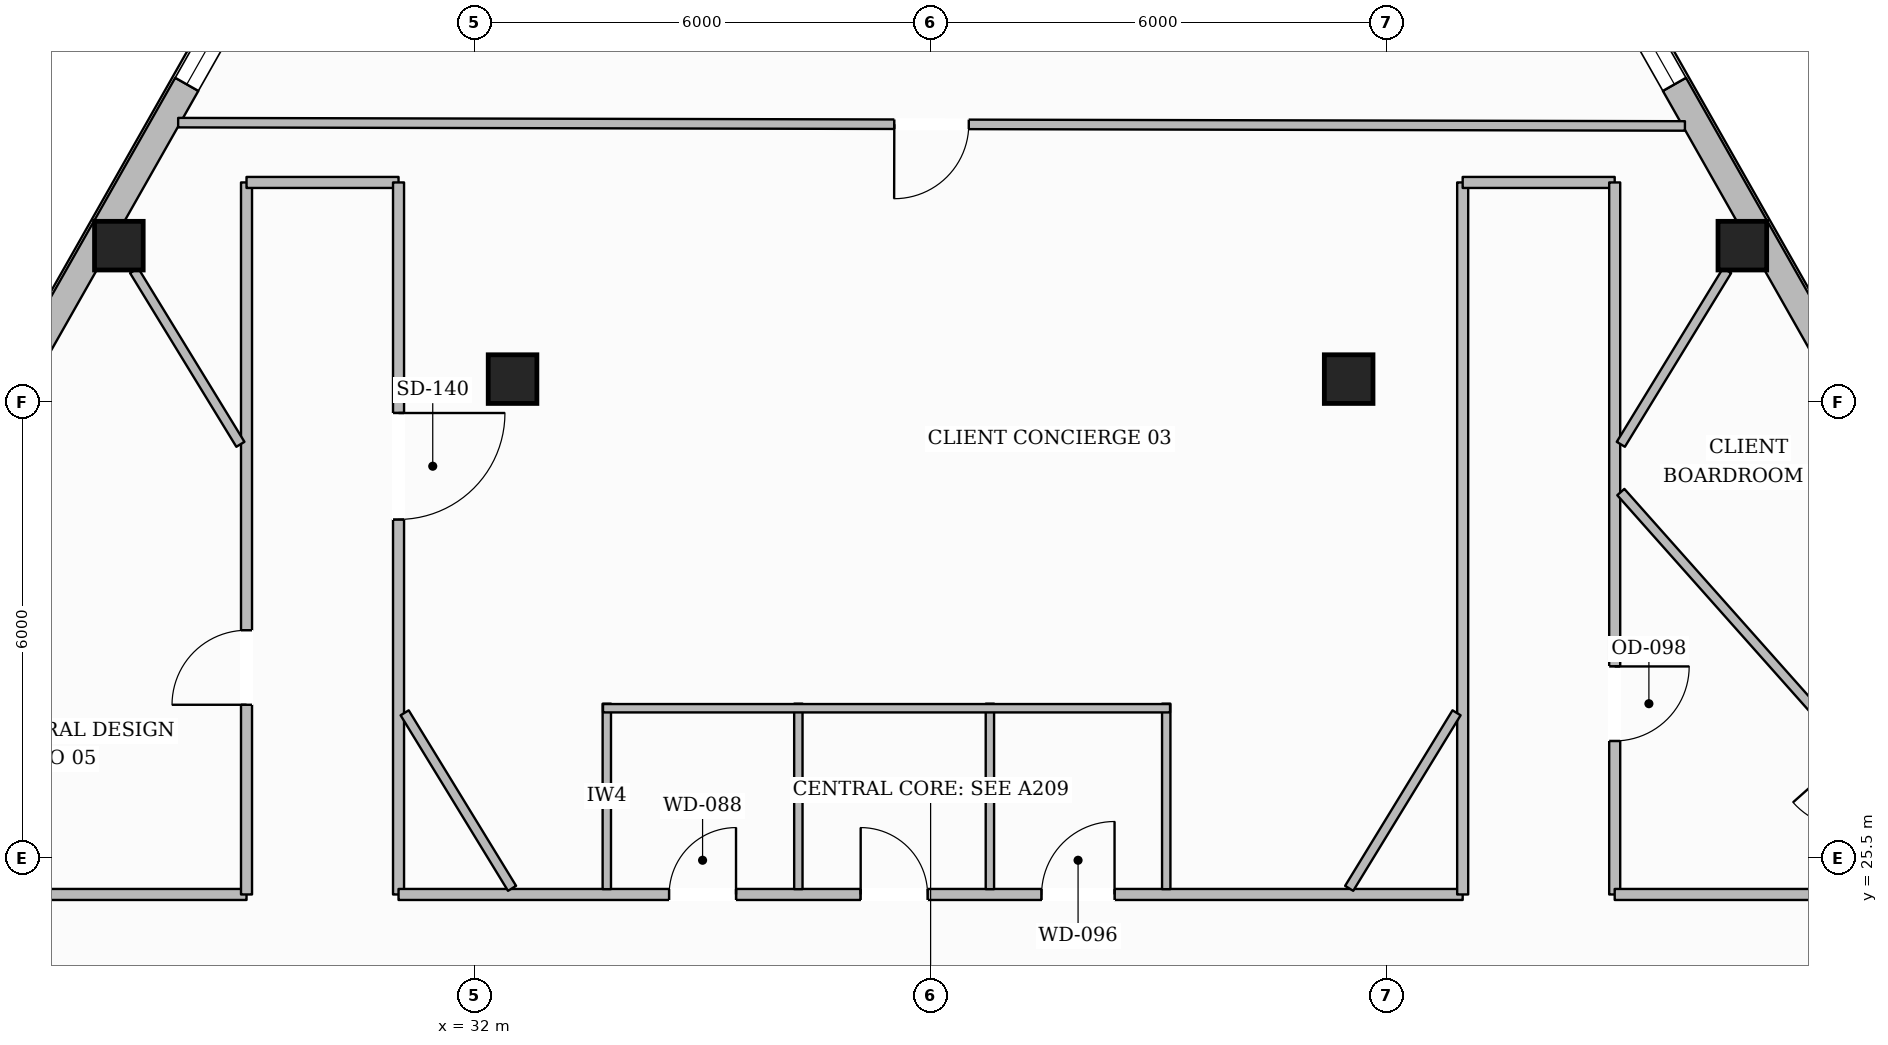
"""IFC4 building model, lengths in metres.
Left out: names, types, materials, properties, quantities, classifications, styles, units other than length and angle.
Written with IfcOpenShell. Run it as: python <this file> out.ifc"""

import sys

from ifc_helpers import new_model, si_unit, direction, frame, frame_2d, origin, origin_2d, place, context, subcontext, project, spatial, rectangle, hollow_rectangle, extrude, element, fill, save


model = new_model("IFC4")
c1 = context("Model", 3, precision=1e-05, world=origin(), true_north=direction((0.0, 1.0)))
c2 = subcontext(c1, "Body", "Model", "MODEL_VIEW")
j1 = project(units=[si_unit("LENGTHUNIT", "METRE"), si_unit("PLANEANGLEUNIT", "RADIAN")], contexts=[c1])
p1 = place(None, origin())
s1 = spatial("IfcSite", under=j1, at=p1, CompositionType="ELEMENT")
p2 = place(p1, origin())
s2 = spatial("IfcBuilding", under=s1, at=p2, CompositionType="ELEMENT")
p3 = place(p2, frame((0.0, 0.0, 165.0)))
s3 = spatial("IfcBuildingStorey", under=s2, at=p3, CompositionType="ELEMENT", Elevation=165.0)
for number, where, z_axis, x_axis in (
    (1, (27.321, 33.556, 0.0), (0.0, 0.0, 1.0), (1.0, 0.0, 0.0)),
    (2, (48.679, 33.556, 0.0), (0.0, 0.0, 1.0), (1.0, 0.0, 0.0)),
    (3, (32.5, 31.8, 0.0), (0.0, 0.0, 1.0), (1.0, 0.0, 0.0)),
    (4, (43.5, 31.8, 0.0), (0.0, 0.0, 1.0), (1.0, 0.0, 0.0)),
):
    element("IfcColumn", number, at=place(p3, frame(where, z_axis=z_axis, x_axis=x_axis)), inside=s3, PredefinedType="COLUMN", context=c2, shape_type="SweptSolid", body=[
        extrude(hollow_rectangle(XDim=0.64, YDim=0.64, WallThickness=0.028, at=origin_2d()), origin(), (0.0, 0.0, 1.0), 3.6),
    ])
p4 = place(p3, frame((14.964, 12.319, 0.0), z_axis=(0.0, 0.0, 1.0), x_axis=(0.493387150796, 0.869809817966, 0.0)))
e5 = element("IfcWall", 5, at=p4, inside=s3, PredefinedType="STANDARD", context=c2, shape_type="SweptSolid", body=[
    extrude(rectangle(XDim=37.096, YDim=0.35, at=frame_2d((18.548, 0.0))), origin(), (0.0, 0.0, 1.0), 3.132),
])
p5 = place(p4, frame((32.879, 0.0, 0.65)))
e6 = element("IfcOpeningElement", 6, at=p5, cuts=e5, PredefinedType="OPENING", context=c2, shape_type="SweptSolid", body=[
    extrude(rectangle(XDim=1.45, YDim=1.75, at=frame_2d((0.725, 0.875))), frame((0.0, 0.185, 0.0), z_axis=(0.0, -1.0, 0.0), x_axis=(1.0, 0.0, 0.0)), (0.0, 0.0, 1.0), 0.37),
])
p6 = place(p4, frame((26.855, 0.0, 0.65)))
e7 = element("IfcOpeningElement", 7, at=p6, cuts=e5, PredefinedType="OPENING", context=c2, shape_type="SweptSolid", body=[
    extrude(rectangle(XDim=1.45, YDim=1.75, at=frame_2d((0.725, 0.875))), frame((0.0, 0.185, 0.0), z_axis=(0.0, -1.0, 0.0), x_axis=(1.0, 0.0, 0.0)), (0.0, 0.0, 1.0), 0.37),
])
p7 = place(p4, frame((14.807, 0.0, 0.65)))
e8 = element("IfcOpeningElement", 8, at=p7, cuts=e5, PredefinedType="OPENING", context=c2, shape_type="SweptSolid", body=[
    extrude(rectangle(XDim=1.45, YDim=1.75, at=frame_2d((0.725, 0.875))), frame((0.0, 0.185, 0.0), z_axis=(0.0, -1.0, 0.0), x_axis=(1.0, 0.0, 0.0)), (0.0, 0.0, 1.0), 0.37),
])
p8 = place(p4, frame((8.783, 0.0, 0.65)))
e9 = element("IfcOpeningElement", 9, at=p8, cuts=e5, PredefinedType="OPENING", context=c2, shape_type="SweptSolid", body=[
    extrude(rectangle(XDim=1.45, YDim=1.75, at=frame_2d((0.725, 0.875))), frame((0.0, 0.185, 0.0), z_axis=(0.0, -1.0, 0.0), x_axis=(1.0, 0.0, 0.0)), (0.0, 0.0, 1.0), 0.37),
])
p9 = place(p4, frame((2.759, 0.0, 0.65)))
e10 = element("IfcOpeningElement", 10, at=p9, cuts=e5, PredefinedType="OPENING", context=c2, shape_type="SweptSolid", body=[
    extrude(rectangle(XDim=1.45, YDim=1.75, at=frame_2d((0.725, 0.875))), frame((0.0, 0.185, 0.0), z_axis=(0.0, -1.0, 0.0), x_axis=(1.0, 0.0, 0.0)), (0.0, 0.0, 1.0), 0.37),
])
p10 = place(p3, frame((42.733, 44.585, 0.0), z_axis=(0.0, 0.0, 1.0), x_axis=(0.493387150796, -0.869809817966, 0.0)))
e11 = element("IfcWall", 11, at=p10, inside=s3, PredefinedType="STANDARD", context=c2, shape_type="SweptSolid", body=[
    extrude(rectangle(XDim=37.096, YDim=0.35, at=frame_2d((18.548, 0.0))), origin(), (0.0, 0.0, 1.0), 3.132),
])
p11 = place(p10, frame((32.886, 0.0, 0.65)))
e12 = element("IfcOpeningElement", 12, at=p11, cuts=e11, PredefinedType="OPENING", context=c2, shape_type="SweptSolid", body=[
    extrude(rectangle(XDim=1.45, YDim=1.75, at=frame_2d((0.725, 0.875))), frame((0.0, 0.185, 0.0), z_axis=(0.0, -1.0, 0.0), x_axis=(1.0, 0.0, 0.0)), (0.0, 0.0, 1.0), 0.37),
])
p12 = place(p10, frame((26.863, 0.0, 0.65)))
e13 = element("IfcOpeningElement", 13, at=p12, cuts=e11, PredefinedType="OPENING", context=c2, shape_type="SweptSolid", body=[
    extrude(rectangle(XDim=1.45, YDim=1.75, at=frame_2d((0.725, 0.875))), frame((0.0, 0.185, 0.0), z_axis=(0.0, -1.0, 0.0), x_axis=(1.0, 0.0, 0.0)), (0.0, 0.0, 1.0), 0.37),
])
p13 = place(p10, frame((14.814, 0.0, 0.65)))
e14 = element("IfcOpeningElement", 14, at=p13, cuts=e11, PredefinedType="OPENING", context=c2, shape_type="SweptSolid", body=[
    extrude(rectangle(XDim=1.45, YDim=1.75, at=frame_2d((0.725, 0.875))), frame((0.0, 0.185, 0.0), z_axis=(0.0, -1.0, 0.0), x_axis=(1.0, 0.0, 0.0)), (0.0, 0.0, 1.0), 0.37),
])
p14 = place(p10, frame((8.791, 0.0, 0.65)))
e15 = element("IfcOpeningElement", 15, at=p14, cuts=e11, PredefinedType="OPENING", context=c2, shape_type="SweptSolid", body=[
    extrude(rectangle(XDim=1.45, YDim=1.75, at=frame_2d((0.725, 0.875))), frame((0.0, 0.185, 0.0), z_axis=(0.0, -1.0, 0.0), x_axis=(1.0, 0.0, 0.0)), (0.0, 0.0, 1.0), 0.37),
])
p15 = place(p10, frame((2.767, 0.0, 0.65)))
e16 = element("IfcOpeningElement", 16, at=p15, cuts=e11, PredefinedType="OPENING", context=c2, shape_type="SweptSolid", body=[
    extrude(rectangle(XDim=1.45, YDim=1.75, at=frame_2d((0.725, 0.875))), frame((0.0, 0.185, 0.0), z_axis=(0.0, -1.0, 0.0), x_axis=(1.0, 0.0, 0.0)), (0.0, 0.0, 1.0), 0.37),
])
p16 = place(p3, frame((26.06, 25.02, 0.0), z_axis=(0.0, 0.0, 1.0), x_axis=(1.0, 0.0, 0.0)))
e17 = element("IfcWall", 17, at=p16, inside=s3, PredefinedType="PARTITIONING", context=c2, shape_type="SweptSolid", body=[
    extrude(rectangle(XDim=2.94, YDim=0.145, at=frame_2d((1.47, 0.0))), origin(), (0.0, 0.0, 1.0), 3.6),
])
p17 = place(p3, frame((29.0, 25.02, 0.0), z_axis=(0.0, 0.0, 1.0), x_axis=(0.0, 1.0, 0.0)))
e18 = element("IfcWall", 18, at=p17, inside=s3, PredefinedType="PARTITIONING", context=c2, shape_type="SweptSolid", body=[
    extrude(rectangle(XDim=9.367, YDim=0.145, at=frame_2d((4.684, 0.0))), origin(), (0.0, 0.0, 1.0), 3.6),
])
p18 = place(p17, frame((2.496, 0.0, 0.0)))
e19 = element("IfcOpeningElement", 19, at=p18, cuts=e18, PredefinedType="OPENING", context=c2, shape_type="SweptSolid", body=[
    extrude(rectangle(XDim=0.98, YDim=2.15, at=frame_2d((0.49, 1.075))), frame((0.0, 0.083, 0.0), z_axis=(0.0, -1.0, 0.0), x_axis=(1.0, 0.0, 0.0)), (0.0, 0.0, 1.0), 0.165),
])
p19 = place(p3, frame((29.0, 34.387, 0.0), z_axis=(0.0, 0.0, 1.0), x_axis=(1.0, 0.0, 0.0)))
e20 = element("IfcWall", 20, at=p19, inside=s3, PredefinedType="PARTITIONING", context=c2, shape_type="SweptSolid", body=[
    extrude(rectangle(XDim=2.0, YDim=0.145, at=frame_2d((1.0, 0.0))), origin(), (0.0, 0.0, 1.0), 3.6),
])
p20 = place(p3, frame((31.0, 34.387, 0.0), z_axis=(0.0, 0.0, 1.0), x_axis=(0.0, -1.0, 0.0)))
e21 = element("IfcWall", 21, at=p20, inside=s3, PredefinedType="PARTITIONING", context=c2, shape_type="SweptSolid", body=[
    extrude(rectangle(XDim=9.367, YDim=0.145, at=frame_2d((4.684, 0.0))), origin(), (0.0, 0.0, 1.0), 3.6),
])
p21 = place(p20, frame((3.033, 0.0, 0.0)))
e22 = element("IfcOpeningElement", 22, at=p21, cuts=e21, PredefinedType="OPENING", context=c2, shape_type="SweptSolid", body=[
    extrude(rectangle(XDim=1.4, YDim=2.2, at=frame_2d((0.7, 1.1))), frame((0.0, 0.083, 0.0), z_axis=(0.0, -1.0, 0.0), x_axis=(1.0, 0.0, 0.0)), (0.0, 0.0, 1.0), 0.165),
])
p22 = place(p3, frame((31.0, 25.02, 0.0), z_axis=(0.0, 0.0, 1.0), x_axis=(1.0, 0.0, 0.0)))
e23 = element("IfcWall", 23, at=p22, inside=s3, PredefinedType="PARTITIONING", context=c2, shape_type="SweptSolid", body=[
    extrude(rectangle(XDim=14.0, YDim=0.145, at=frame_2d((7.0, 0.0))), origin(), (0.0, 0.0, 1.0), 3.6),
])
p23 = place(p22, frame((3.56, 0.0, 0.0)))
e24 = element("IfcOpeningElement", 24, at=p23, cuts=e23, PredefinedType="OPENING", context=c2, shape_type="SweptSolid", body=[
    extrude(rectangle(XDim=0.88, YDim=2.1, at=frame_2d((0.44, 1.05))), frame((0.0, 0.083, 0.0), z_axis=(0.0, -1.0, 0.0), x_axis=(1.0, 0.0, 0.0)), (0.0, 0.0, 1.0), 0.165),
])
p24 = place(p22, frame((6.08, 0.0, 0.0)))
e25 = element("IfcOpeningElement", 25, at=p24, cuts=e23, PredefinedType="OPENING", context=c2, shape_type="SweptSolid", body=[
    extrude(rectangle(XDim=0.88, YDim=2.1, at=frame_2d((0.44, 1.05))), frame((0.0, 0.083, 0.0), z_axis=(0.0, -1.0, 0.0), x_axis=(1.0, 0.0, 0.0)), (0.0, 0.0, 1.0), 0.165),
])
p25 = place(p22, frame((8.46, 0.0, 0.0)))
e26 = element("IfcOpeningElement", 26, at=p25, cuts=e23, PredefinedType="OPENING", context=c2, shape_type="SweptSolid", body=[
    extrude(rectangle(XDim=0.96, YDim=2.1, at=frame_2d((0.48, 1.05))), frame((0.0, 0.083, 0.0), z_axis=(0.0, -1.0, 0.0), x_axis=(1.0, 0.0, 0.0)), (0.0, 0.0, 1.0), 0.165),
])
p26 = place(p3, frame((45.0, 25.02, 0.0), z_axis=(0.0, 0.0, 1.0), x_axis=(0.0, 1.0, 0.0)))
e27 = element("IfcWall", 27, at=p26, inside=s3, PredefinedType="PARTITIONING", context=c2, shape_type="SweptSolid", body=[
    extrude(rectangle(XDim=9.367, YDim=0.145, at=frame_2d((4.684, 0.0))), origin(), (0.0, 0.0, 1.0), 3.6),
])
p27 = place(p3, frame((45.0, 34.387, 0.0), z_axis=(0.0, 0.0, 1.0), x_axis=(1.0, 0.0, 0.0)))
e28 = element("IfcWall", 28, at=p27, inside=s3, PredefinedType="PARTITIONING", context=c2, shape_type="SweptSolid", body=[
    extrude(rectangle(XDim=2.0, YDim=0.145, at=frame_2d((1.0, 0.0))), origin(), (0.0, 0.0, 1.0), 3.6),
])
p28 = place(p3, frame((47.0, 34.387, 0.0), z_axis=(0.0, 0.0, 1.0), x_axis=(0.0, -1.0, 0.0)))
e29 = element("IfcWall", 29, at=p28, inside=s3, PredefinedType="PARTITIONING", context=c2, shape_type="SweptSolid", body=[
    extrude(rectangle(XDim=9.367, YDim=0.145, at=frame_2d((4.684, 0.0))), origin(), (0.0, 0.0, 1.0), 3.6),
])
p29 = place(p28, frame((6.367, 0.0, 0.0)))
e30 = element("IfcOpeningElement", 30, at=p29, cuts=e29, PredefinedType="OPENING", context=c2, shape_type="SweptSolid", body=[
    extrude(rectangle(XDim=0.98, YDim=2.15, at=frame_2d((0.49, 1.075))), frame((0.0, 0.083, 0.0), z_axis=(0.0, -1.0, 0.0), x_axis=(1.0, 0.0, 0.0)), (0.0, 0.0, 1.0), 0.165),
])
p30 = place(p3, frame((47.0, 25.02, 0.0), z_axis=(0.0, 0.0, 1.0), x_axis=(1.0, 0.0, 0.0)))
e31 = element("IfcWall", 31, at=p30, inside=s3, PredefinedType="PARTITIONING", context=c2, shape_type="SweptSolid", body=[
    extrude(rectangle(XDim=2.94, YDim=0.145, at=frame_2d((1.47, 0.0))), origin(), (0.0, 0.0, 1.0), 3.6),
])
for number, where, z_axis, x_axis in (
    (32, (33.74, 25.09, 0.0), (0.0, 0.0, 1.0), (0.0, 1.0, 0.0)),
    (33, (36.26, 25.09, 0.0), (0.0, 0.0, 1.0), (0.0, 1.0, 0.0)),
    (34, (38.78, 25.09, 0.0), (0.0, 0.0, 1.0), (0.0, 1.0, 0.0)),
    (35, (41.1, 25.09, 0.0), (0.0, 0.0, 1.0), (0.0, 1.0, 0.0)),
):
    element("IfcWall", number, at=place(p3, frame(where, z_axis=z_axis, x_axis=x_axis)), inside=s3, PredefinedType="PLUMBINGWALL", context=c2, shape_type="SweptSolid", body=[
        extrude(rectangle(XDim=2.44, YDim=0.11, at=frame_2d((1.22, 0.0))), origin(), (0.0, 0.0, 1.0), 3.6),
    ])
p31 = place(p3, frame((33.69, 27.47, 0.0), z_axis=(0.0, 0.0, 1.0), x_axis=(1.0, 0.0, 0.0)))
e36 = element("IfcWall", 36, at=p31, inside=s3, PredefinedType="PLUMBINGWALL", context=c2, shape_type="SweptSolid", body=[
    extrude(rectangle(XDim=7.46, YDim=0.11, at=frame_2d((3.73, 0.0))), origin(), (0.0, 0.0, 1.0), 3.6),
])
p32 = place(p3, frame((43.507, 25.101, 0.0), z_axis=(0.0, 0.0, 1.0), x_axis=(0.521876732826, 0.853020911664, 0.0)))
e37 = element("IfcWall", 37, at=p32, inside=s3, PredefinedType="PARTITIONING", context=c2, shape_type="SweptSolid", body=[
    extrude(rectangle(XDim=2.707, YDim=0.125, at=frame_2d((1.354, 0.0))), origin(), (0.0, 0.0, 1.0), 3.6),
])
p33 = place(p3, frame((47.081, 30.942, 0.0), z_axis=(0.0, 0.0, 1.0), x_axis=(0.52187383072, 0.85302268716, 0.0)))
e38 = element("IfcWall", 38, at=p33, inside=s3, PredefinedType="PARTITIONING", context=c2, shape_type="SweptSolid", body=[
    extrude(rectangle(XDim=2.679, YDim=0.125, at=frame_2d((1.34, 0.0))), origin(), (0.0, 0.0, 1.0), 3.6),
])
p34 = place(p3, frame((32.493, 25.101, 0.0), z_axis=(0.0, 0.0, 1.0), x_axis=(-0.521876732826, 0.853020911664, 0.0)))
e39 = element("IfcWall", 39, at=p34, inside=s3, PredefinedType="PARTITIONING", context=c2, shape_type="SweptSolid", body=[
    extrude(rectangle(XDim=2.707, YDim=0.125, at=frame_2d((1.354, 0.0))), origin(), (0.0, 0.0, 1.0), 3.6),
])
p35 = place(p3, frame((28.919, 30.942, 0.0), z_axis=(0.0, 0.0, 1.0), x_axis=(-0.52187383072, 0.85302268716, 0.0)))
e40 = element("IfcWall", 40, at=p35, inside=s3, PredefinedType="PARTITIONING", context=c2, shape_type="SweptSolid", body=[
    extrude(rectangle(XDim=2.679, YDim=0.125, at=frame_2d((1.34, 0.0))), origin(), (0.0, 0.0, 1.0), 3.6),
])
p36 = place(p3, frame((53.807, 22.75, 0.0), z_axis=(0.0, 0.0, 1.0), x_axis=(-0.664519515039, 0.747270910803, 0.0)))
e41 = element("IfcWall", 41, at=p36, inside=s3, PredefinedType="PARTITIONING", context=c2, shape_type="SweptSolid", body=[
    extrude(rectangle(XDim=10.123, YDim=0.125, at=frame_2d((5.061, 0.0))), origin(), (0.0, 0.0, 1.0), 3.339),
])
p37 = place(p36, frame((4.547, 0.0, 0.0)))
e42 = element("IfcOpeningElement", 42, at=p37, cuts=e41, PredefinedType="OPENING", context=c2, shape_type="SweptSolid", body=[
    extrude(rectangle(XDim=1.02, YDim=2.15, at=frame_2d((0.51, 1.075))), frame((0.0, 0.073, 0.0), z_axis=(0.0, -1.0, 0.0), x_axis=(1.0, 0.0, 0.0)), (0.0, 0.0, 1.0), 0.145),
])
p38 = place(p3, frame((47.924, 35.13, 0.0), z_axis=(0.0, 0.0, 1.0), x_axis=(-0.999997570066, 0.002204509588, 0.0)))
e43 = element("IfcWall", 43, at=p38, inside=s3, PredefinedType="PARTITIONING", context=c2, shape_type="SweptSolid", body=[
    extrude(rectangle(XDim=19.823, YDim=0.125, at=frame_2d((9.912, 0.0))), origin(), (0.0, 0.0, 1.0), 3.6),
])
p39 = place(p38, frame((9.422, 0.0, 0.0)))
e44 = element("IfcOpeningElement", 44, at=p39, cuts=e43, PredefinedType="OPENING", context=c2, shape_type="SweptSolid", body=[
    extrude(rectangle(XDim=0.98, YDim=2.15, at=frame_2d((0.49, 1.075))), frame((0.0, 0.073, 0.0), z_axis=(0.0, -1.0, 0.0), x_axis=(1.0, 0.0, 0.0)), (0.0, 0.0, 1.0), 0.145),
])
p40 = place(p6, origin())
e45 = element("IfcWindow", 45, at=p40, inside=s3, PartitioningType="SINGLE_PANEL", PredefinedType="WINDOW", context=c2, shape_type="SweptSolid", body=[
    extrude(rectangle(XDim=1.45, YDim=1.75, at=frame_2d((0.725, 0.875))), frame((0.0, 0.03, 0.0), z_axis=(0.0, -1.0, 0.0), x_axis=(1.0, 0.0, 0.0)), (0.0, 0.0, 1.0), 0.06),
])
fill(e7, e45)
p41 = place(p14, origin())
e46 = element("IfcWindow", 46, at=p41, inside=s3, PartitioningType="SINGLE_PANEL", PredefinedType="WINDOW", context=c2, shape_type="SweptSolid", body=[
    extrude(rectangle(XDim=1.45, YDim=1.75, at=frame_2d((0.725, 0.875))), frame((0.0, 0.03, 0.0), z_axis=(0.0, -1.0, 0.0), x_axis=(1.0, 0.0, 0.0)), (0.0, 0.0, 1.0), 0.06),
])
fill(e15, e46)
p42 = place(p23, origin())
e47 = element("IfcDoor", 47, at=p42, inside=s3, OperationType="SINGLE_SWING_RIGHT", PredefinedType="DOOR", context=c2, shape_type="SweptSolid", body=[
    extrude(rectangle(XDim=0.88, YDim=2.1, at=frame_2d((0.44, 1.05))), frame((0.0, 0.025, 0.0), z_axis=(0.0, -1.0, 0.0), x_axis=(1.0, 0.0, 0.0)), (0.0, 0.0, 1.0), 0.05),
])
fill(e24, e47)
p43 = place(p24, origin())
e48 = element("IfcDoor", 48, at=p43, inside=s3, OperationType="SINGLE_SWING_LEFT", PredefinedType="DOOR", context=c2, shape_type="SweptSolid", body=[
    extrude(rectangle(XDim=0.88, YDim=2.1, at=frame_2d((0.44, 1.05))), frame((0.0, 0.025, 0.0), z_axis=(0.0, -1.0, 0.0), x_axis=(1.0, 0.0, 0.0)), (0.0, 0.0, 1.0), 0.05),
])
fill(e25, e48)
p44 = place(p25, origin())
e49 = element("IfcDoor", 49, at=p44, inside=s3, OperationType="SINGLE_SWING_RIGHT", PredefinedType="DOOR", context=c2, shape_type="SweptSolid", body=[
    extrude(rectangle(XDim=0.96, YDim=2.1, at=frame_2d((0.48, 1.05))), frame((0.0, 0.025, 0.0), z_axis=(0.0, -1.0, 0.0), x_axis=(1.0, 0.0, 0.0)), (0.0, 0.0, 1.0), 0.05),
])
fill(e26, e49)
p45 = place(p29, origin())
e50 = element("IfcDoor", 50, at=p45, inside=s3, OperationType="SINGLE_SWING_LEFT", PredefinedType="DOOR", context=c2, shape_type="SweptSolid", body=[
    extrude(rectangle(XDim=0.98, YDim=2.15, at=frame_2d((0.49, 1.075))), frame((0.0, 0.025, 0.0), z_axis=(0.0, -1.0, 0.0), x_axis=(1.0, 0.0, 0.0)), (0.0, 0.0, 1.0), 0.05),
])
fill(e30, e50)
p46 = place(p21, origin())
e51 = element("IfcDoor", 51, at=p46, inside=s3, OperationType="SINGLE_SWING_LEFT", PredefinedType="DOOR", context=c2, shape_type="SweptSolid", body=[
    extrude(rectangle(XDim=1.4, YDim=2.2, at=frame_2d((0.7, 1.1))), frame((0.0, 0.025, 0.0), z_axis=(0.0, -1.0, 0.0), x_axis=(1.0, 0.0, 0.0)), (0.0, 0.0, 1.0), 0.05),
])
fill(e22, e51)
p47 = place(p39, origin())
e52 = element("IfcDoor", 52, at=p47, inside=s3, OperationType="SINGLE_SWING_RIGHT", PredefinedType="DOOR", context=c2, shape_type="SweptSolid", body=[
    extrude(rectangle(XDim=0.98, YDim=2.15, at=frame_2d((0.49, 1.075))), frame((0.0, 0.025, 0.0), z_axis=(0.0, -1.0, 0.0), x_axis=(1.0, 0.0, 0.0)), (0.0, 0.0, 1.0), 0.05),
])
fill(e44, e52)
p48 = place(p18, origin())
e53 = element("IfcDoor", 53, at=p48, inside=s3, OperationType="SINGLE_SWING_LEFT", PredefinedType="DOOR", context=c2, shape_type="SweptSolid", body=[
    extrude(rectangle(XDim=0.98, YDim=2.15, at=frame_2d((0.49, 1.075))), frame((0.0, 0.025, 0.0), z_axis=(0.0, -1.0, 0.0), x_axis=(1.0, 0.0, 0.0)), (0.0, 0.0, 1.0), 0.05),
])
fill(e19, e53)
save(model, sys.argv[1])
